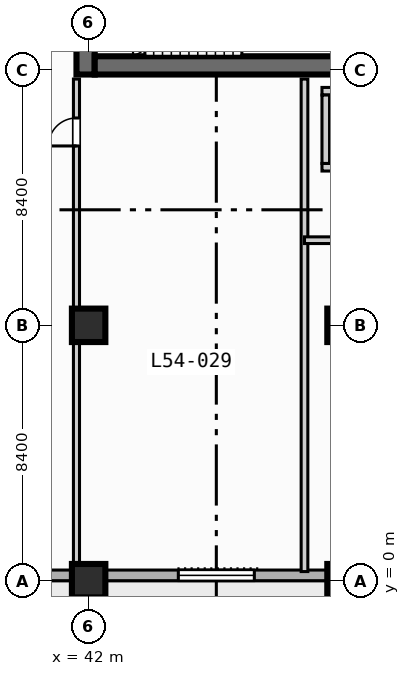
"""IFC4 building model, lengths in metres.
Left out: names, types, materials, properties, quantities, classifications, styles, units other than length and angle.
Written with IfcOpenShell. Run it as: python <this file> out.ifc"""

import sys

from ifc_helpers import new_model, si_unit, direction, frame, frame_2d, origin, origin_2d, place, context, subcontext, project, spatial, rectangle, extrude, element, fill, save


model = new_model("IFC4")
c1 = context("Model", 3, precision=1e-05, world=origin(), true_north=direction((0.0, 1.0)))
c2 = subcontext(c1, "Body", "Model", "MODEL_VIEW")
j1 = project(units=[si_unit("LENGTHUNIT", "METRE"), si_unit("PLANEANGLEUNIT", "RADIAN")], contexts=[c1])
p1 = place(None, origin())
s1 = spatial("IfcSite", under=j1, at=p1, CompositionType="ELEMENT")
p2 = place(p1, origin())
s2 = spatial("IfcBuilding", under=s1, at=p2, CompositionType="ELEMENT")
p3 = place(p2, frame((0.0, 0.0, 219.8)))
s3 = spatial("IfcBuildingStorey", under=s2, at=p3, CompositionType="ELEMENT", Elevation=219.8)
p4 = place(p3, frame((41.9, 16.65, 0.0), z_axis=(0.0, 0.0, 1.0), x_axis=(0.0, 1.0, 0.0)))
e1 = element("IfcWall", 1, at=p4, inside=s3, PredefinedType="SHEAR", context=c2, shape_type="SweptSolid", body=[
    extrude(rectangle(XDim=1.35, YDim=0.6, at=frame_2d((0.675, 0.0))), origin(), (0.0, 0.0, 1.0), 3.97),
])
p5 = place(p3, frame((42.2, 16.95, 0.0), z_axis=(0.0, 0.0, 1.0), x_axis=(1.0, 0.0, 0.0)))
e2 = element("IfcWall", 2, at=p5, inside=s3, PredefinedType="SHEAR", context=c2, shape_type="SweptSolid", body=[
    extrude(rectangle(XDim=16.35, YDim=0.6, at=frame_2d((8.175, 0.0))), origin(), (0.0, 0.0, 1.0), 3.97),
])
for number, where, z_axis, x_axis in (
    (3, (42.0, 0.0, 0.0), (0.0, 0.0, 1.0), (1.0, 0.0, 0.0)),
    (4, (42.0, 8.4, 0.0), (0.0, 0.0, 1.0), (1.0, 0.0, 0.0)),
    (5, (50.4, 0.0, 0.0), (0.0, 0.0, 1.0), (1.0, 0.0, 0.0)),
    (6, (50.4, 8.4, 0.0), (0.0, 0.0, 1.0), (1.0, 0.0, 0.0)),
):
    element("IfcColumn", number, at=place(p3, frame(where, z_axis=z_axis, x_axis=x_axis)), inside=s3, PredefinedType="COLUMN", context=c2, shape_type="SweptSolid", body=[
        extrude(rectangle(XDim=1.1, YDim=1.1, at=origin_2d()), origin(), (0.0, 0.0, 1.0), 4.2),
    ])
p6 = place(p3, frame((72.425, 0.175, 0.0), z_axis=(0.0, 0.0, 1.0), x_axis=(-1.0, 0.0, 0.0)))
e7 = element("IfcWall", 7, at=p6, inside=s3, PredefinedType="STANDARD", context=c2, shape_type="SweptSolid", body=[
    extrude(rectangle(XDim=69.25, YDim=0.35, at=frame_2d((34.625, 0.0))), origin(), (0.0, 0.0, 1.0), 3.97),
])
p7 = place(p6, frame((50.725, 0.0, 0.0)))
e8 = element("IfcOpeningElement", 8, at=p7, cuts=e7, PredefinedType="OPENING", context=c2, shape_type="SweptSolid", body=[
    extrude(rectangle(XDim=1.4, YDim=2.2, at=frame_2d((0.7, 1.1))), frame((0.0, 0.185, 0.0), z_axis=(0.0, -1.0, 0.0), x_axis=(1.0, 0.0, 0.0)), (0.0, 0.0, 1.0), 0.37),
])
p8 = place(p6, frame((24.975, 0.0, 0.85)))
e9 = element("IfcOpeningElement", 9, at=p8, cuts=e7, PredefinedType="OPENING", context=c2, shape_type="SweptSolid", body=[
    extrude(rectangle(XDim=2.5, YDim=2.2, at=frame_2d((1.25, 1.1))), frame((0.0, 0.185, 0.0), z_axis=(0.0, -1.0, 0.0), x_axis=(1.0, 0.0, 0.0)), (0.0, 0.0, 1.0), 0.37),
])
p9 = place(p6, frame((8.175, 0.0, 0.85)))
e10 = element("IfcOpeningElement", 10, at=p9, cuts=e7, PredefinedType="OPENING", context=c2, shape_type="SweptSolid", body=[
    extrude(rectangle(XDim=2.5, YDim=2.2, at=frame_2d((1.25, 1.1))), frame((0.0, 0.185, 0.0), z_axis=(0.0, -1.0, 0.0), x_axis=(1.0, 0.0, 0.0)), (0.0, 0.0, 1.0), 0.37),
])
p10 = place(p3, frame((49.675, 13.6, 0.0), z_axis=(0.0, 0.0, 1.0), x_axis=(1.0, 0.0, 0.0)))
e11 = element("IfcWall", 11, at=p10, inside=s3, PredefinedType="SOLIDWALL", context=c2, shape_type="SweptSolid", body=[
    extrude(rectangle(XDim=2.25, YDim=0.25, at=frame_2d((1.125, 0.0))), origin(), (0.0, 0.0, 1.0), 3.97),
])
p11 = place(p10, frame((0.4, 0.0, 0.0)))
e12 = element("IfcOpeningElement", 12, at=p11, cuts=e11, PredefinedType="OPENING", context=c2, shape_type="SweptSolid", body=[
    extrude(rectangle(XDim=1.1, YDim=2.15, at=frame_2d((0.55, 1.075))), frame((0.0, 0.135, 0.0), z_axis=(0.0, -1.0, 0.0), x_axis=(1.0, 0.0, 0.0)), (0.0, 0.0, 1.0), 0.27),
])
for number, where, z_axis, x_axis in (
    (13, (49.675, 16.1, 0.0), (0.0, 0.0, 1.0), (1.0, 0.0, 0.0)),
    (14, (49.8, 13.725, 0.0), (0.0, 0.0, 1.0), (0.0, 1.0, 0.0)),
):
    element("IfcWall", number, at=place(p3, frame(where, z_axis=z_axis, x_axis=x_axis)), inside=s3, PredefinedType="SOLIDWALL", context=c2, shape_type="SweptSolid", body=[
        extrude(rectangle(XDim=2.25, YDim=0.25, at=frame_2d((1.125, 0.0))), origin(), (0.0, 0.0, 1.0), 3.97),
    ])
p12 = place(p3, frame((41.6, 0.3, 0.0), z_axis=(0.0, 0.0, 1.0), x_axis=(0.0, 1.0, 0.0)))
e15 = element("IfcWall", 15, at=p12, inside=s3, PredefinedType="PARTITIONING", context=c2, shape_type="SweptSolid", body=[
    extrude(rectangle(XDim=16.2, YDim=0.2, at=frame_2d((8.1, 0.0))), origin(), (0.0, 0.0, 1.0), 3.97),
])
p13 = place(p12, frame((14.0, 0.0, 0.0)))
e16 = element("IfcOpeningElement", 16, at=p13, cuts=e15, PredefinedType="OPENING", context=c2, shape_type="SweptSolid", body=[
    extrude(rectangle(XDim=0.92, YDim=2.1, at=frame_2d((0.46, 1.05))), frame((0.0, 0.11, 0.0), z_axis=(0.0, -1.0, 0.0), x_axis=(1.0, 0.0, 0.0)), (0.0, 0.0, 1.0), 0.22),
])
p14 = place(p3, frame((49.1, 0.3, 0.0), z_axis=(0.0, 0.0, 1.0), x_axis=(0.0, 1.0, 0.0)))
e17 = element("IfcWall", 17, at=p14, inside=s3, PredefinedType="PARTITIONING", context=c2, shape_type="SweptSolid", body=[
    extrude(rectangle(XDim=16.2, YDim=0.22, at=frame_2d((8.1, 0.0))), origin(), (0.0, 0.0, 1.0), 3.97),
])
p15 = place(p3, frame((49.1, 11.2, 0.0), z_axis=(0.0, 0.0, 1.0), x_axis=(1.0, 0.0, 0.0)))
e18 = element("IfcWall", 18, at=p15, inside=s3, PredefinedType="PARTITIONING", context=c2, shape_type="SweptSolid", body=[
    extrude(rectangle(XDim=9.3, YDim=0.22, at=frame_2d((4.65, 0.0))), origin(), (0.0, 0.0, 1.0), 3.97),
])
p16 = place(p8, origin())
e19 = element("IfcWindow", 19, at=p16, inside=s3, PartitioningType="SINGLE_PANEL", PredefinedType="WINDOW", context=c2, shape_type="SweptSolid", body=[
    extrude(rectangle(XDim=2.5, YDim=2.2, at=frame_2d((1.25, 1.1))), frame((0.0, 0.03, 0.0), z_axis=(0.0, -1.0, 0.0), x_axis=(1.0, 0.0, 0.0)), (0.0, 0.0, 1.0), 0.06),
])
fill(e9, e19)
p17 = place(p13, origin())
e20 = element("IfcDoor", 20, at=p17, inside=s3, OperationType="SINGLE_SWING_LEFT", PredefinedType="DOOR", context=c2, shape_type="SweptSolid", body=[
    extrude(rectangle(XDim=0.92, YDim=2.1, at=frame_2d((0.46, 1.05))), frame((0.0, 0.025, 0.0), z_axis=(0.0, -1.0, 0.0), x_axis=(1.0, 0.0, 0.0)), (0.0, 0.0, 1.0), 0.05),
])
fill(e16, e20)
save(model, sys.argv[1])
